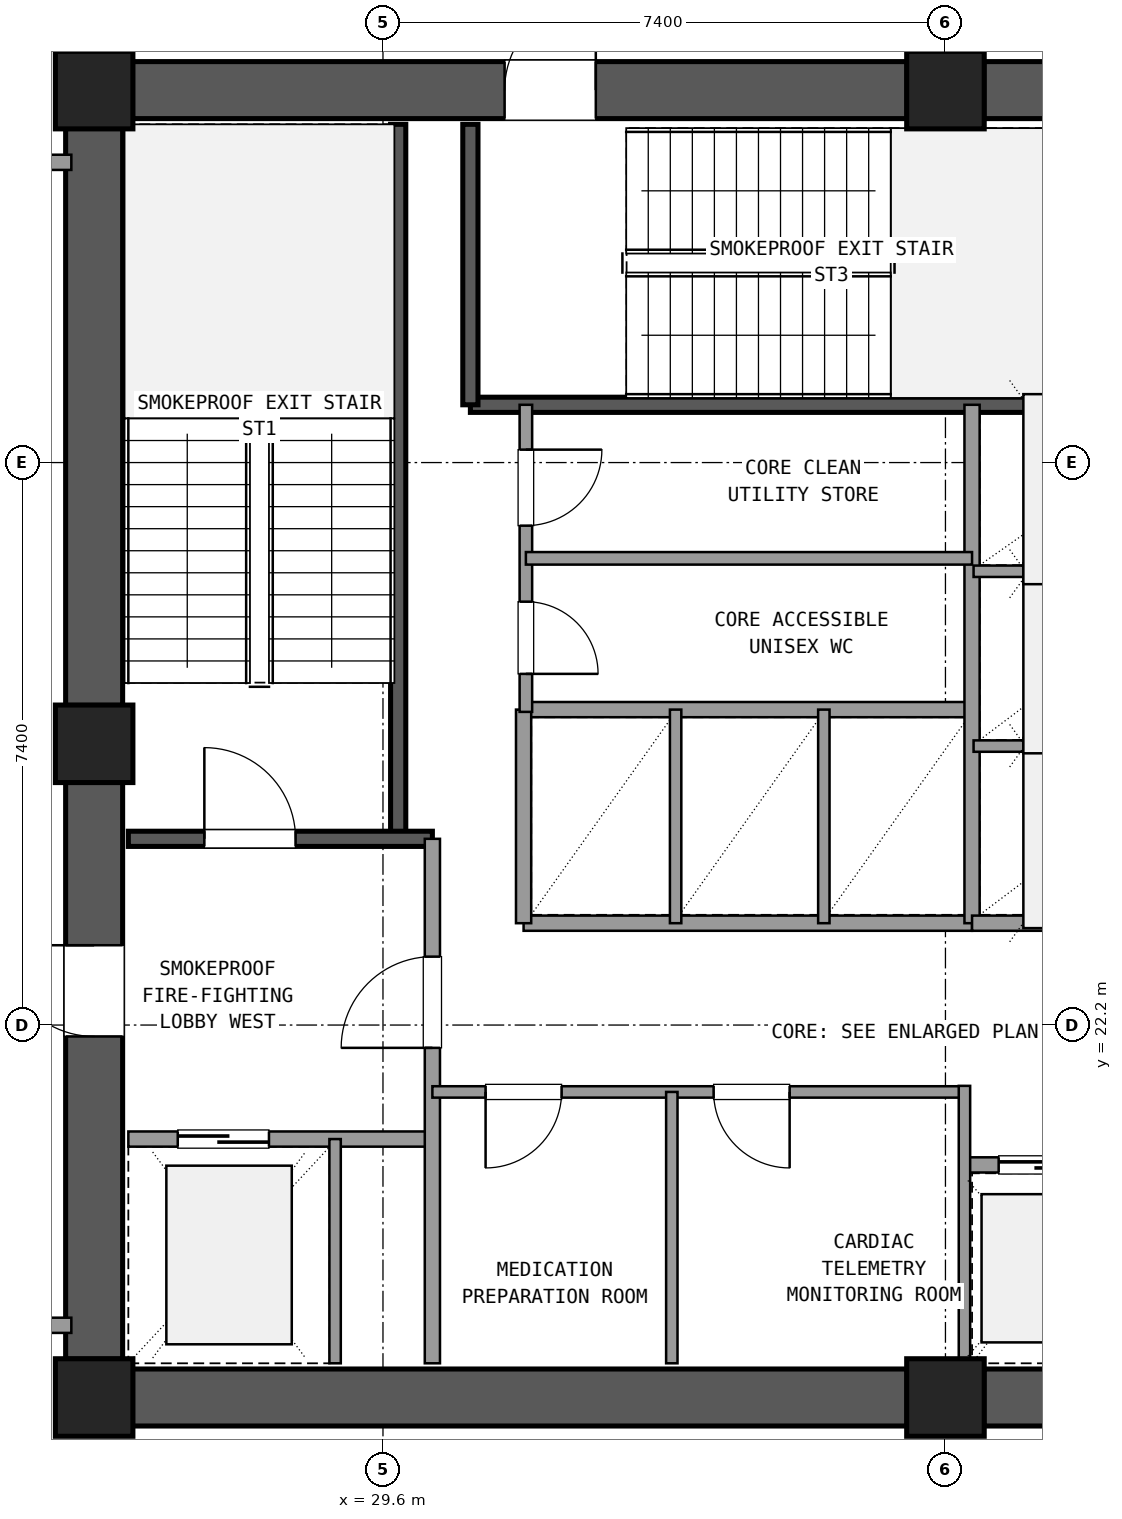
"""IFC4 building model, lengths in metres.
Left out: names, types, materials, properties, quantities, classifications, styles, units other than length and angle.
Written with IfcOpenShell. Run it as: python <this file> out.ifc"""

import sys

from ifc_helpers import new_model, si_unit, direction, frame, frame_2d, origin, origin_2d, place, context, subcontext, project, spatial, rectangle, extrude, element, fill, save


model = new_model("IFC4")
c1 = context("Model", 3, precision=1e-05, world=origin(), true_north=direction((0.0, 1.0)))
c2 = subcontext(c1, "Body", "Model", "MODEL_VIEW")
j1 = project(units=[si_unit("LENGTHUNIT", "METRE"), si_unit("PLANEANGLEUNIT", "RADIAN")], contexts=[c1])
p1 = place(None, origin())
s1 = spatial("IfcSite", under=j1, at=p1, CompositionType="ELEMENT")
p2 = place(p1, origin())
s2 = spatial("IfcBuilding", under=s1, at=p2, CompositionType="ELEMENT")
p3 = place(p2, frame((0.0, 0.0, 124.38)))
s3 = spatial("IfcBuildingStorey", under=s2, at=p3, CompositionType="ELEMENT", Elevation=124.38)
for number, where, z_axis, x_axis in (
    (1, (25.8, 17.3, 0.0), (0.0, 0.0, 1.0), (1.0, 0.0, 0.0)),
    (2, (37.0, 17.3, 0.0), (0.0, 0.0, 1.0), (1.0, 0.0, 0.0)),
    (3, (37.0, 34.5, 0.0), (0.0, 0.0, 1.0), (1.0, 0.0, 0.0)),
    (4, (25.8, 34.5, 0.0), (0.0, 0.0, 1.0), (1.0, 0.0, 0.0)),
    (5, (25.8, 25.9, 0.0), (0.0, 0.0, 1.0), (1.0, 0.0, 0.0)),
):
    element("IfcColumn", number, at=place(p3, frame(where, z_axis=z_axis, x_axis=x_axis)), inside=s3, PredefinedType="COLUMN", context=c2, shape_type="SweptSolid", body=[
        extrude(rectangle(XDim=1.02, YDim=1.02, at=origin_2d()), origin(), (0.0, 0.0, 1.0), 4.68),
    ])
for number, where, z_axis, x_axis in (
    (6, (26.305, 17.3, 0.0), (0.0, 0.0, 1.0), (1.0, 0.0, 0.0)),
    (7, (37.505, 17.3, 0.0), (0.0, 0.0, 1.0), (1.0, 0.0, 0.0)),
):
    element("IfcWall", number, at=place(p3, frame(where, z_axis=z_axis, x_axis=x_axis)), inside=s3, PredefinedType="SHEAR", context=c2, shape_type="SweptSolid", body=[
        extrude(rectangle(XDim=10.19, YDim=0.75, at=frame_2d((5.095, 0.0))), origin(), (0.0, 0.0, 1.0), 4.38),
    ])
p4 = place(p3, frame((47.695, 34.5, 0.0), z_axis=(0.0, 0.0, 1.0), x_axis=(-1.0, 0.0, 0.0)))
e8 = element("IfcWall", 8, at=p4, inside=s3, PredefinedType="SHEAR", context=c2, shape_type="SweptSolid", body=[
    extrude(rectangle(XDim=10.19, YDim=0.75, at=frame_2d((5.095, 0.0))), origin(), (0.0, 0.0, 1.0), 4.38),
])
p5 = place(p4, frame((4.595, 0.0, 0.0)))
e9 = element("IfcOpeningElement", 9, at=p5, cuts=e8, PredefinedType="OPENING", context=c2, shape_type="SweptSolid", body=[
    extrude(rectangle(XDim=1.6, YDim=2.2, at=frame_2d((0.8, 1.1))), frame((0.0, 0.385, 0.0), z_axis=(0.0, -1.0, 0.0), x_axis=(1.0, 0.0, 0.0)), (0.0, 0.0, 1.0), 0.77),
])
p6 = place(p3, frame((36.495, 34.5, 0.0), z_axis=(0.0, 0.0, 1.0), x_axis=(-1.0, 0.0, 0.0)))
e10 = element("IfcWall", 10, at=p6, inside=s3, PredefinedType="SHEAR", context=c2, shape_type="SweptSolid", body=[
    extrude(rectangle(XDim=10.19, YDim=0.75, at=frame_2d((5.095, 0.0))), origin(), (0.0, 0.0, 1.0), 4.38),
])
p7 = place(p6, frame((4.095, 0.0, 0.0)))
e11 = element("IfcOpeningElement", 11, at=p7, cuts=e10, PredefinedType="OPENING", context=c2, shape_type="SweptSolid", body=[
    extrude(rectangle(XDim=1.2, YDim=2.15, at=frame_2d((0.6, 1.075))), frame((0.0, 0.385, 0.0), z_axis=(0.0, -1.0, 0.0), x_axis=(1.0, 0.0, 0.0)), (0.0, 0.0, 1.0), 0.77),
])
p8 = place(p3, frame((25.8, 33.995, 0.0), z_axis=(0.0, 0.0, 1.0), x_axis=(0.0, -1.0, 0.0)))
e12 = element("IfcWall", 12, at=p8, inside=s3, PredefinedType="SHEAR", context=c2, shape_type="SweptSolid", body=[
    extrude(rectangle(XDim=7.59, YDim=0.75, at=frame_2d((3.795, 0.0))), origin(), (0.0, 0.0, 1.0), 4.38),
])
p9 = place(p3, frame((25.8, 25.395, 0.0), z_axis=(0.0, 0.0, 1.0), x_axis=(0.0, -1.0, 0.0)))
e13 = element("IfcWall", 13, at=p9, inside=s3, PredefinedType="SHEAR", context=c2, shape_type="SweptSolid", body=[
    extrude(rectangle(XDim=7.59, YDim=0.75, at=frame_2d((3.795, 0.0))), origin(), (0.0, 0.0, 1.0), 4.38),
])
p10 = place(p9, frame((2.145, 0.0, 0.0)))
e14 = element("IfcOpeningElement", 14, at=p10, cuts=e13, PredefinedType="OPENING", context=c2, shape_type="SweptSolid", body=[
    extrude(rectangle(XDim=1.2, YDim=2.15, at=frame_2d((0.6, 1.075))), frame((0.0, 0.385, 0.0), z_axis=(0.0, -1.0, 0.0), x_axis=(1.0, 0.0, 0.0)), (0.0, 0.0, 1.0), 0.77),
])
p11 = place(p3, frame((29.8, 24.65, 0.0), z_axis=(0.0, 0.0, 1.0), x_axis=(0.0, 1.0, 0.0)))
e15 = element("IfcWall", 15, at=p11, inside=s3, PredefinedType="SHEAR", context=c2, shape_type="SweptSolid", body=[
    extrude(rectangle(XDim=9.4, YDim=0.2, at=frame_2d((4.7, 0.0))), origin(), (0.0, 0.0, 1.0), 4.38),
])
p12 = place(p3, frame((26.25, 24.65, 0.0), z_axis=(0.0, 0.0, 1.0), x_axis=(1.0, 0.0, 0.0)))
e16 = element("IfcWall", 16, at=p12, inside=s3, PredefinedType="SHEAR", context=c2, shape_type="SweptSolid", body=[
    extrude(rectangle(XDim=4.0, YDim=0.2, at=frame_2d((2.0, 0.0))), origin(), (0.0, 0.0, 1.0), 4.38),
])
p13 = place(p12, frame((1.0, 0.0, 0.0)))
e17 = element("IfcOpeningElement", 17, at=p13, cuts=e16, PredefinedType="OPENING", context=c2, shape_type="SweptSolid", body=[
    extrude(rectangle(XDim=1.2, YDim=2.15, at=frame_2d((0.6, 1.075))), frame((0.0, 0.11, 0.0), z_axis=(0.0, -1.0, 0.0), x_axis=(1.0, 0.0, 0.0)), (0.0, 0.0, 1.0), 0.22),
])
p14 = place(p3, frame((30.75, 30.36, 0.0), z_axis=(0.0, 0.0, 1.0), x_axis=(1.0, 0.0, 0.0)))
e18 = element("IfcWall", 18, at=p14, inside=s3, PredefinedType="SHEAR", context=c2, shape_type="SweptSolid", body=[
    extrude(rectangle(XDim=9.5, YDim=0.2, at=frame_2d((4.75, 0.0))), origin(), (0.0, 0.0, 1.0), 4.38),
])
p15 = place(p3, frame((30.75, 30.36, 0.0), z_axis=(0.0, 0.0, 1.0), x_axis=(0.0, 1.0, 0.0)))
e19 = element("IfcWall", 19, at=p15, inside=s3, PredefinedType="SHEAR", context=c2, shape_type="SweptSolid", body=[
    extrude(rectangle(XDim=3.69, YDim=0.2, at=frame_2d((1.845, 0.0))), origin(), (0.0, 0.0, 1.0), 4.38),
])
p16 = place(p3, frame((26.25, 20.7, 0.0), z_axis=(0.0, 0.0, 1.0), x_axis=(1.0, 0.0, 0.0)))
e20 = element("IfcWall", 20, at=p16, inside=s3, PredefinedType="SOLIDWALL", context=c2, shape_type="SweptSolid", body=[
    extrude(rectangle(XDim=4.0, YDim=0.2, at=frame_2d((2.0, 0.0))), origin(), (0.0, 0.0, 1.0), 3.49),
])
p17 = place(p16, frame((0.65, 0.0, 0.0)))
e21 = element("IfcOpeningElement", 21, at=p17, cuts=e20, PredefinedType="OPENING", context=c2, shape_type="SweptSolid", body=[
    extrude(rectangle(XDim=1.2, YDim=2.15, at=frame_2d((0.6, 1.075))), frame((0.0, 0.11, 0.0), z_axis=(0.0, -1.0, 0.0), x_axis=(1.0, 0.0, 0.0)), (0.0, 0.0, 1.0), 0.22),
])
p18 = place(p3, frame((30.25, 17.75, 0.0), z_axis=(0.0, 0.0, 1.0), x_axis=(0.0, 1.0, 0.0)))
e22 = element("IfcWall", 22, at=p18, inside=s3, PredefinedType="SOLIDWALL", context=c2, shape_type="SweptSolid", body=[
    extrude(rectangle(XDim=6.9, YDim=0.2, at=frame_2d((3.45, 0.0))), origin(), (0.0, 0.0, 1.0), 3.49),
])
p19 = place(p18, frame((4.15, 0.0, 0.0)))
e23 = element("IfcOpeningElement", 23, at=p19, cuts=e22, PredefinedType="OPENING", context=c2, shape_type="SweptSolid", body=[
    extrude(rectangle(XDim=1.2, YDim=2.15, at=frame_2d((0.6, 1.075))), frame((0.0, 0.11, 0.0), z_axis=(0.0, -1.0, 0.0), x_axis=(1.0, 0.0, 0.0)), (0.0, 0.0, 1.0), 0.22),
])
p20 = place(p3, frame((28.97, 17.75, 0.0), z_axis=(0.0, 0.0, 1.0), x_axis=(0.0, 1.0, 0.0)))
e24 = element("IfcWall", 24, at=p20, inside=s3, PredefinedType="PARTITIONING", context=c2, shape_type="SweptSolid", body=[
    extrude(rectangle(XDim=2.95, YDim=0.15, at=frame_2d((1.475, 0.0))), origin(), (0.0, 0.0, 1.0), 3.49),
])
p21 = place(p3, frame((30.25, 21.32, 0.0), z_axis=(0.0, 0.0, 1.0), x_axis=(1.0, 0.0, 0.0)))
e25 = element("IfcWall", 25, at=p21, inside=s3, PredefinedType="PARTITIONING", context=c2, shape_type="SweptSolid", body=[
    extrude(rectangle(XDim=7.0, YDim=0.15, at=frame_2d((3.5, 0.0))), origin(), (0.0, 0.0, 1.0), 3.49),
])
p22 = place(p21, frame((0.7, 0.0, 0.0)))
e26 = element("IfcOpeningElement", 26, at=p22, cuts=e25, PredefinedType="OPENING", context=c2, shape_type="SweptSolid", body=[
    extrude(rectangle(XDim=1.0, YDim=2.15, at=frame_2d((0.5, 1.075))), frame((0.0, 0.085, 0.0), z_axis=(0.0, -1.0, 0.0), x_axis=(1.0, 0.0, 0.0)), (0.0, 0.0, 1.0), 0.17),
])
p23 = place(p21, frame((3.7, 0.0, 0.0)))
e27 = element("IfcOpeningElement", 27, at=p23, cuts=e25, PredefinedType="OPENING", context=c2, shape_type="SweptSolid", body=[
    extrude(rectangle(XDim=1.0, YDim=2.15, at=frame_2d((0.5, 1.075))), frame((0.0, 0.085, 0.0), z_axis=(0.0, -1.0, 0.0), x_axis=(1.0, 0.0, 0.0)), (0.0, 0.0, 1.0), 0.17),
])
p24 = place(p3, frame((33.4, 17.75, 0.0), z_axis=(0.0, 0.0, 1.0), x_axis=(0.0, 1.0, 0.0)))
e28 = element("IfcWall", 28, at=p24, inside=s3, PredefinedType="PARTITIONING", context=c2, shape_type="SweptSolid", body=[
    extrude(rectangle(XDim=3.57, YDim=0.15, at=frame_2d((1.785, 0.0))), origin(), (0.0, 0.0, 1.0), 3.49),
])
p25 = place(p3, frame((37.25, 20.36, 0.0), z_axis=(0.0, 0.0, 1.0), x_axis=(1.0, 0.0, 0.0)))
e29 = element("IfcWall", 29, at=p25, inside=s3, PredefinedType="SOLIDWALL", context=c2, shape_type="SweptSolid", body=[
    extrude(rectangle(XDim=6.1, YDim=0.2, at=frame_2d((3.05, 0.0))), origin(), (0.0, 0.0, 1.0), 3.49),
])
p26 = place(p25, frame((0.45, 0.0, 0.0)))
e30 = element("IfcOpeningElement", 30, at=p26, cuts=e29, PredefinedType="OPENING", context=c2, shape_type="SweptSolid", body=[
    extrude(rectangle(XDim=1.1, YDim=2.15, at=frame_2d((0.55, 1.075))), frame((0.0, 0.11, 0.0), z_axis=(0.0, -1.0, 0.0), x_axis=(1.0, 0.0, 0.0)), (0.0, 0.0, 1.0), 0.22),
])
p27 = place(p25, frame((2.5, 0.0, 0.0)))
e31 = element("IfcOpeningElement", 31, at=p27, cuts=e29, PredefinedType="OPENING", context=c2, shape_type="SweptSolid", body=[
    extrude(rectangle(XDim=1.1, YDim=2.15, at=frame_2d((0.55, 1.075))), frame((0.0, 0.11, 0.0), z_axis=(0.0, -1.0, 0.0), x_axis=(1.0, 0.0, 0.0)), (0.0, 0.0, 1.0), 0.22),
])
p28 = place(p25, frame((4.55, 0.0, 0.0)))
e32 = element("IfcOpeningElement", 32, at=p28, cuts=e29, PredefinedType="OPENING", context=c2, shape_type="SweptSolid", body=[
    extrude(rectangle(XDim=1.1, YDim=2.15, at=frame_2d((0.55, 1.075))), frame((0.0, 0.11, 0.0), z_axis=(0.0, -1.0, 0.0), x_axis=(1.0, 0.0, 0.0)), (0.0, 0.0, 1.0), 0.22),
])
p29 = place(p3, frame((37.25, 17.75, 0.0), z_axis=(0.0, 0.0, 1.0), x_axis=(0.0, 1.0, 0.0)))
e33 = element("IfcWall", 33, at=p29, inside=s3, PredefinedType="PARTITIONING", context=c2, shape_type="SweptSolid", body=[
    extrude(rectangle(XDim=3.65, YDim=0.15, at=frame_2d((1.825, 0.0))), origin(), (0.0, 0.0, 1.0), 3.49),
])
for number, where, z_axis, x_axis in (
    (34, (31.45, 23.54, 0.0), (0.0, 0.0, 1.0), (1.0, 0.0, 0.0)),
    (35, (31.45, 26.35, 0.0), (0.0, 0.0, 1.0), (1.0, 0.0, 0.0)),
):
    element("IfcWall", number, at=place(p3, frame(where, z_axis=z_axis, x_axis=x_axis)), inside=s3, PredefinedType="SOLIDWALL", context=c2, shape_type="SweptSolid", body=[
        extrude(rectangle(XDim=5.9, YDim=0.2, at=frame_2d((2.95, 0.0))), origin(), (0.0, 0.0, 1.0), 3.49),
    ])
p30 = place(p3, frame((31.45, 23.54, 0.0), z_axis=(0.0, 0.0, 1.0), x_axis=(0.0, 1.0, 0.0)))
e36 = element("IfcWall", 36, at=p30, inside=s3, PredefinedType="SOLIDWALL", context=c2, shape_type="SweptSolid", body=[
    extrude(rectangle(XDim=2.81, YDim=0.2, at=frame_2d((1.405, 0.0))), origin(), (0.0, 0.0, 1.0), 3.49),
])
for number, where, z_axis, x_axis in (
    (37, (33.45, 23.54, 0.0), (0.0, 0.0, 1.0), (0.0, 1.0, 0.0)),
    (38, (35.4, 23.54, 0.0), (0.0, 0.0, 1.0), (0.0, 1.0, 0.0)),
):
    element("IfcWall", number, at=place(p3, frame(where, z_axis=z_axis, x_axis=x_axis)), inside=s3, PredefinedType="PARTITIONING", context=c2, shape_type="SweptSolid", body=[
        extrude(rectangle(XDim=2.81, YDim=0.15, at=frame_2d((1.405, 0.0))), origin(), (0.0, 0.0, 1.0), 3.49),
    ])
p31 = place(p3, frame((37.35, 23.54, 0.0), z_axis=(0.0, 0.0, 1.0), x_axis=(0.0, 1.0, 0.0)))
e39 = element("IfcWall", 39, at=p31, inside=s3, PredefinedType="SOLIDWALL", context=c2, shape_type="SweptSolid", body=[
    extrude(rectangle(XDim=6.82, YDim=0.2, at=frame_2d((3.41, 0.0))), origin(), (0.0, 0.0, 1.0), 3.49),
])
p32 = place(p3, frame((37.35, 23.54, 0.0), z_axis=(0.0, 0.0, 1.0), x_axis=(1.0, 0.0, 0.0)))
e40 = element("IfcWall", 40, at=p32, inside=s3, PredefinedType="SOLIDWALL", context=c2, shape_type="SweptSolid", body=[
    extrude(rectangle(XDim=3.05, YDim=0.2, at=frame_2d((1.525, 0.0))), origin(), (0.0, 0.0, 1.0), 3.49),
])
for number, where, z_axis, x_axis in (
    (41, (37.37, 25.87, 0.0), (0.0, 0.0, 1.0), (1.0, 0.0, 0.0)),
    (42, (37.37, 28.17, 0.0), (0.0, 0.0, 1.0), (1.0, 0.0, 0.0)),
):
    element("IfcWall", number, at=place(p3, frame(where, z_axis=z_axis, x_axis=x_axis)), inside=s3, PredefinedType="PARTITIONING", context=c2, shape_type="SweptSolid", body=[
        extrude(rectangle(XDim=3.01, YDim=0.15, at=frame_2d((1.505, 0.0))), origin(), (0.0, 0.0, 1.0), 3.49),
    ])
p33 = place(p3, frame((31.48, 26.32, 0.0), z_axis=(0.0, 0.0, 1.0), x_axis=(0.0, 1.0, 0.0)))
e43 = element("IfcWall", 43, at=p33, inside=s3, PredefinedType="PLUMBINGWALL", context=c2, shape_type="SweptSolid", body=[
    extrude(rectangle(XDim=4.04, YDim=0.165, at=frame_2d((2.02, 0.0))), origin(), (0.0, 0.0, 1.0), 3.49),
])
p34 = place(p33, frame((0.5, 0.0, 0.0)))
e44 = element("IfcOpeningElement", 44, at=p34, cuts=e43, PredefinedType="OPENING", context=c2, shape_type="SweptSolid", body=[
    extrude(rectangle(XDim=0.95, YDim=2.1, at=frame_2d((0.475, 1.05))), frame((0.0, 0.093, 0.0), z_axis=(0.0, -1.0, 0.0), x_axis=(1.0, 0.0, 0.0)), (0.0, 0.0, 1.0), 0.185),
])
p35 = place(p33, frame((2.45, 0.0, 0.0)))
e45 = element("IfcOpeningElement", 45, at=p35, cuts=e43, PredefinedType="OPENING", context=c2, shape_type="SweptSolid", body=[
    extrude(rectangle(XDim=1.0, YDim=2.15, at=frame_2d((0.5, 1.075))), frame((0.0, 0.093, 0.0), z_axis=(0.0, -1.0, 0.0), x_axis=(1.0, 0.0, 0.0)), (0.0, 0.0, 1.0), 0.185),
])
p36 = place(p3, frame((31.48, 28.34, 0.0), z_axis=(0.0, 0.0, 1.0), x_axis=(1.0, 0.0, 0.0)))
e46 = element("IfcWall", 46, at=p36, inside=s3, PredefinedType="PLUMBINGWALL", context=c2, shape_type="SweptSolid", body=[
    extrude(rectangle(XDim=5.87, YDim=0.165, at=frame_2d((2.935, 0.0))), origin(), (0.0, 0.0, 1.0), 3.49),
])
p37 = place(p3, frame((26.0, 34.8, 0.0), z_axis=(0.0, 0.0, 1.0), x_axis=(0.0, 1.0, 0.0)))
e47 = element("IfcWall", 47, at=p37, inside=s3, PredefinedType="SOLIDWALL", context=c2, shape_type="SweptSolid", body=[
    extrude(rectangle(XDim=10.4, YDim=0.2, at=frame_2d((5.2, 0.0))), origin(), (0.0, 0.0, 1.0), 3.49),
])
for number, where, z_axis, x_axis in (
    (48, (16.4, 18.25, 0.0), (0.0, 0.0, 1.0), (1.0, 0.0, 0.0)),
    (49, (16.4, 33.55, 0.0), (0.0, 0.0, 1.0), (1.0, 0.0, 0.0)),
):
    element("IfcWall", number, at=place(p3, frame(where, z_axis=z_axis, x_axis=x_axis)), inside=s3, PredefinedType="SOLIDWALL", context=c2, shape_type="SweptSolid", body=[
        extrude(rectangle(XDim=9.1, YDim=0.2, at=frame_2d((4.55, 0.0))), origin(), (0.0, 0.0, 1.0), 3.49),
    ])
p38 = place(p13, origin())
e50 = element("IfcDoor", 50, at=p38, inside=s3, OperationType="SINGLE_SWING_LEFT", PredefinedType="DOOR", context=c2, shape_type="SweptSolid", body=[
    extrude(rectangle(XDim=1.2, YDim=2.15, at=frame_2d((0.6, 1.075))), frame((0.0, 0.025, 0.0), z_axis=(0.0, -1.0, 0.0), x_axis=(1.0, 0.0, 0.0)), (0.0, 0.0, 1.0), 0.05),
])
fill(e17, e50)
p39 = place(p17, origin())
e51 = element("IfcDoor", 51, at=p39, inside=s3, OperationType="SLIDING_TO_LEFT", PredefinedType="DOOR", context=c2, shape_type="SweptSolid", body=[
    extrude(rectangle(XDim=1.2, YDim=2.15, at=frame_2d((0.6, 1.075))), frame((0.0, 0.025, 0.0), z_axis=(0.0, -1.0, 0.0), x_axis=(1.0, 0.0, 0.0)), (0.0, 0.0, 1.0), 0.05),
])
fill(e21, e51)
p40 = place(p19, origin())
e52 = element("IfcDoor", 52, at=p40, inside=s3, OperationType="SINGLE_SWING_LEFT", PredefinedType="DOOR", context=c2, shape_type="SweptSolid", body=[
    extrude(rectangle(XDim=1.2, YDim=2.15, at=frame_2d((0.6, 1.075))), frame((0.0, 0.025, 0.0), z_axis=(0.0, -1.0, 0.0), x_axis=(1.0, 0.0, 0.0)), (0.0, 0.0, 1.0), 0.05),
])
fill(e23, e52)
p41 = place(p10, frame((1.2, 0.0, 0.0), z_axis=(0.0, 0.0, 1.0), x_axis=(-1.0, 0.0, 0.0)))
e53 = element("IfcDoor", 53, at=p41, inside=s3, OperationType="SINGLE_SWING_LEFT", PredefinedType="DOOR", context=c2, shape_type="SweptSolid", body=[
    extrude(rectangle(XDim=1.2, YDim=2.15, at=frame_2d((0.6, 1.075))), frame((0.0, 0.025, 0.0), z_axis=(0.0, -1.0, 0.0), x_axis=(1.0, 0.0, 0.0)), (0.0, 0.0, 1.0), 0.05),
])
fill(e14, e53)
p42 = place(p7, frame((1.2, 0.0, 0.0), z_axis=(0.0, 0.0, 1.0), x_axis=(-1.0, 0.0, 0.0)))
e54 = element("IfcDoor", 54, at=p42, inside=s3, OperationType="SINGLE_SWING_LEFT", PredefinedType="DOOR", context=c2, shape_type="SweptSolid", body=[
    extrude(rectangle(XDim=1.2, YDim=2.15, at=frame_2d((0.6, 1.075))), frame((0.0, 0.025, 0.0), z_axis=(0.0, -1.0, 0.0), x_axis=(1.0, 0.0, 0.0)), (0.0, 0.0, 1.0), 0.05),
])
fill(e11, e54)
p43 = place(p22, frame((1.0, 0.0, 0.0), z_axis=(0.0, 0.0, 1.0), x_axis=(-1.0, 0.0, 0.0)))
e55 = element("IfcDoor", 55, at=p43, inside=s3, OperationType="SINGLE_SWING_LEFT", PredefinedType="DOOR", context=c2, shape_type="SweptSolid", body=[
    extrude(rectangle(XDim=1.0, YDim=2.15, at=frame_2d((0.5, 1.075))), frame((0.0, 0.025, 0.0), z_axis=(0.0, -1.0, 0.0), x_axis=(1.0, 0.0, 0.0)), (0.0, 0.0, 1.0), 0.05),
])
fill(e26, e55)
p44 = place(p23, frame((1.0, 0.0, 0.0), z_axis=(0.0, 0.0, 1.0), x_axis=(-1.0, 0.0, 0.0)))
e56 = element("IfcDoor", 56, at=p44, inside=s3, OperationType="SINGLE_SWING_RIGHT", PredefinedType="DOOR", context=c2, shape_type="SweptSolid", body=[
    extrude(rectangle(XDim=1.0, YDim=2.15, at=frame_2d((0.5, 1.075))), frame((0.0, 0.025, 0.0), z_axis=(0.0, -1.0, 0.0), x_axis=(1.0, 0.0, 0.0)), (0.0, 0.0, 1.0), 0.05),
])
fill(e27, e56)
p45 = place(p26, origin())
e57 = element("IfcDoor", 57, at=p45, inside=s3, OperationType="SLIDING_TO_LEFT", PredefinedType="DOOR", context=c2, shape_type="SweptSolid", body=[
    extrude(rectangle(XDim=1.1, YDim=2.15, at=frame_2d((0.55, 1.075))), frame((0.0, 0.025, 0.0), z_axis=(0.0, -1.0, 0.0), x_axis=(1.0, 0.0, 0.0)), (0.0, 0.0, 1.0), 0.05),
])
fill(e30, e57)
p46 = place(p34, frame((0.95, 0.0, 0.0), z_axis=(0.0, 0.0, 1.0), x_axis=(-1.0, 0.0, 0.0)))
e58 = element("IfcDoor", 58, at=p46, inside=s3, OperationType="SINGLE_SWING_LEFT", PredefinedType="DOOR", context=c2, shape_type="SweptSolid", body=[
    extrude(rectangle(XDim=0.95, YDim=2.1, at=frame_2d((0.475, 1.05))), frame((0.0, 0.025, 0.0), z_axis=(0.0, -1.0, 0.0), x_axis=(1.0, 0.0, 0.0)), (0.0, 0.0, 1.0), 0.05),
])
fill(e44, e58)
p47 = place(p35, frame((1.0, 0.0, 0.0), z_axis=(0.0, 0.0, 1.0), x_axis=(-1.0, 0.0, 0.0)))
e59 = element("IfcDoor", 59, at=p47, inside=s3, OperationType="SINGLE_SWING_RIGHT", PredefinedType="DOOR", context=c2, shape_type="SweptSolid", body=[
    extrude(rectangle(XDim=1.0, YDim=2.15, at=frame_2d((0.5, 1.075))), frame((0.0, 0.025, 0.0), z_axis=(0.0, -1.0, 0.0), x_axis=(1.0, 0.0, 0.0)), (0.0, 0.0, 1.0), 0.05),
])
fill(e45, e59)
save(model, sys.argv[1])
